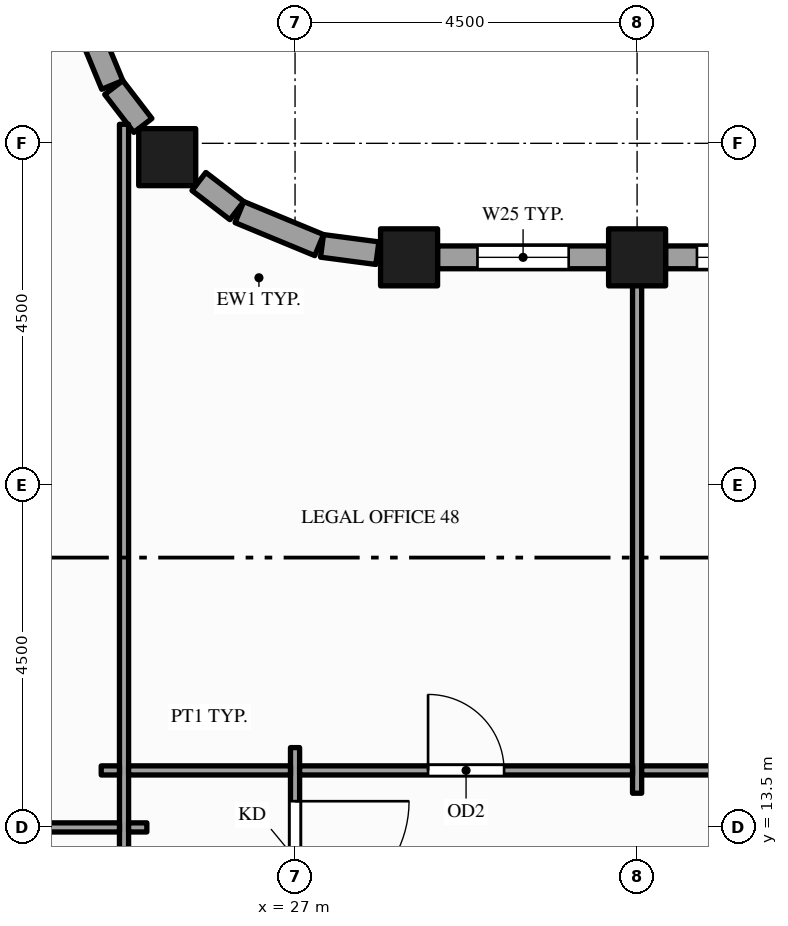
"""IFC4 building model, lengths in metres.
Left out: names, types, materials, properties, quantities, classifications, styles, units other than length and angle.
Written with IfcOpenShell. Run it as: python <this file> out.ifc"""

import sys

from ifc_helpers import new_model, si_unit, direction, frame, frame_2d, origin, origin_2d, place, context, subcontext, project, spatial, rectangle, hollow_rectangle, extrude, element, fill, save


model = new_model("IFC4")
c1 = context("Model", 3, precision=1e-05, world=origin(), true_north=direction((0.0, 1.0)))
c2 = subcontext(c1, "Body", "Model", "MODEL_VIEW")
j1 = project(units=[si_unit("LENGTHUNIT", "METRE"), si_unit("PLANEANGLEUNIT", "RADIAN")], contexts=[c1])
p1 = place(None, origin())
s1 = spatial("IfcSite", under=j1, at=p1, CompositionType="ELEMENT")
p2 = place(p1, origin())
s2 = spatial("IfcBuilding", under=s1, at=p2, CompositionType="ELEMENT")
p3 = place(p2, frame((0.0, 0.0, 239.0)))
s3 = spatial("IfcBuildingStorey", under=s2, at=p3, CompositionType="ELEMENT", Elevation=239.0)
p4 = place(p3, frame((25.318, 22.318, -0.15), z_axis=(0.0, 0.0, 1.0), x_axis=(1.0, 0.0, 0.0)))
e1 = element("IfcColumn", 1, at=p4, inside=s3, PredefinedType="COLUMN", context=c2, shape_type="SweptSolid", body=[
    extrude(hollow_rectangle(XDim=0.75, YDim=0.75, WallThickness=0.036, at=origin_2d()), origin(), (0.0, 0.0, 1.0), 3.85),
])
for number, where, z_axis, x_axis in (
    (2, (28.5, 21.0, -0.15), (0.0, 0.0, 1.0), (1.0, 0.0, 0.0)),
    (3, (31.5, 21.0, -0.15), (0.0, 0.0, 1.0), (1.0, 0.0, 0.0)),
):
    element("IfcColumn", number, at=place(p3, frame(where, z_axis=z_axis, x_axis=x_axis)), inside=s3, PredefinedType="COLUMN", context=c2, shape_type="SweptSolid", body=[
        extrude(hollow_rectangle(XDim=0.75, YDim=0.75, WallThickness=0.036, at=origin_2d()), origin(), (0.0, 0.0, 1.0), 3.9),
    ])
p5 = place(p3, frame((35.625, 21.0, 0.0), z_axis=(0.0, 0.0, 1.0), x_axis=(-1.0, 0.0, 0.0)))
e4 = element("IfcWall", 4, at=p5, inside=s3, PredefinedType="STANDARD", context=c2, shape_type="SweptSolid", body=[
    extrude(rectangle(XDim=3.75, YDim=0.3, at=frame_2d((1.875, 0.0))), origin(), (0.0, 0.0, 1.0), 2.77),
])
p6 = place(p5, frame((0.413, 0.0, 0.9)))
e5 = element("IfcOpeningElement", 5, at=p6, cuts=e4, PredefinedType="OPENING", context=c2, shape_type="SweptSolid", body=[
    extrude(rectangle(XDim=1.15, YDim=1.5, at=frame_2d((0.575, 0.75))), frame((0.0, 0.16, 0.0), z_axis=(0.0, -1.0, 0.0), x_axis=(1.0, 0.0, 0.0)), (0.0, 0.0, 1.0), 0.32),
])
p7 = place(p5, frame((2.188, 0.0, 0.9)))
e6 = element("IfcOpeningElement", 6, at=p7, cuts=e4, PredefinedType="OPENING", context=c2, shape_type="SweptSolid", body=[
    extrude(rectangle(XDim=1.15, YDim=1.5, at=frame_2d((0.575, 0.75))), frame((0.0, 0.16, 0.0), z_axis=(0.0, -1.0, 0.0), x_axis=(1.0, 0.0, 0.0)), (0.0, 0.0, 1.0), 0.32),
])
p8 = place(p3, frame((31.125, 21.0, 0.0), z_axis=(0.0, 0.0, 1.0), x_axis=(-1.0, 0.0, 0.0)))
e7 = element("IfcWall", 7, at=p8, inside=s3, PredefinedType="STANDARD", context=c2, shape_type="SweptSolid", body=[
    extrude(rectangle(XDim=2.25, YDim=0.3, at=frame_2d((1.125, 0.0))), origin(), (0.0, 0.0, 1.0), 2.77),
])
p9 = place(p8, frame((0.525, 0.0, 0.9)))
e8 = element("IfcOpeningElement", 8, at=p9, cuts=e7, PredefinedType="OPENING", context=c2, shape_type="SweptSolid", body=[
    extrude(rectangle(XDim=1.2, YDim=1.5, at=frame_2d((0.6, 0.75))), frame((0.0, 0.16, 0.0), z_axis=(0.0, -1.0, 0.0), x_axis=(1.0, 0.0, 0.0)), (0.0, 0.0, 1.0), 0.32),
])
p10 = place(p3, frame((28.083, 21.055, 0.0), z_axis=(0.0, 0.0, 1.0), x_axis=(-0.99142711513, 0.130660917588, 0.0)))
e9 = element("IfcWall", 9, at=p10, inside=s3, PredefinedType="STANDARD", context=c2, shape_type="SweptSolid", body=[
    extrude(rectangle(XDim=0.734, YDim=0.3, at=frame_2d((0.367, 0.0))), origin(), (0.0, 0.0, 1.0), 3.057),
])
p11 = place(p3, frame((27.317, 21.161, 0.0), z_axis=(0.0, 0.0, 1.0), x_axis=(-0.923914616768, 0.382598720491, 0.0)))
e10 = element("IfcWall", 10, at=p11, inside=s3, PredefinedType="STANDARD", context=c2, shape_type="SweptSolid", body=[
    extrude(rectangle(XDim=1.135, YDim=0.3, at=frame_2d((0.568, 0.0))), origin(), (0.0, 0.0, 1.0), 2.77),
])
for number, where, z_axis, x_axis in (
    (11, (26.234, 21.615, 0.0), (0.0, 0.0, 1.0), (-0.794, 0.608, 0.0)),
    (12, (24.998, 22.735, 0.0), (0.0, 0.0, 1.0), (-0.608, 0.794, 0.0)),
):
    element("IfcWall", number, at=place(p3, frame(where, z_axis=z_axis, x_axis=x_axis)), inside=s3, PredefinedType="STANDARD", context=c2, shape_type="SweptSolid", body=[
        extrude(rectangle(XDim=0.629, YDim=0.3, at=frame_2d((0.314, 0.0))), origin(), (0.0, 0.0, 1.0), 3.057),
    ])
p12 = place(p3, frame((24.595, 23.268, 0.0), z_axis=(0.0, 0.0, 1.0), x_axis=(-0.382598720491, 0.923914616768, 0.0)))
e13 = element("IfcWall", 13, at=p12, inside=s3, PredefinedType="STANDARD", context=c2, shape_type="SweptSolid", body=[
    extrude(rectangle(XDim=1.135, YDim=0.3, at=frame_2d((0.568, 0.0))), origin(), (0.0, 0.0, 1.0), 3.057),
])
p13 = place(p3, frame((24.75, -1.35, 0.0), z_axis=(0.0, 0.0, 1.0), x_axis=(0.0, 1.0, 0.0)))
e14 = element("IfcWall", 14, at=p13, inside=s3, PredefinedType="PARTITIONING", context=c2, shape_type="SweptSolid", body=[
    extrude(rectangle(XDim=24.101, YDim=0.12, at=frame_2d((12.05, 0.0))), origin(), (0.0, 0.0, 1.0), 2.72),
])
p14 = place(p13, frame((12.975, 0.0, 0.0)))
e15 = element("IfcOpeningElement", 15, at=p14, cuts=e14, PredefinedType="OPENING", context=c2, shape_type="SweptSolid", body=[
    extrude(rectangle(XDim=1.5, YDim=2.1, at=frame_2d((0.75, 1.05))), frame((0.0, 0.07, 0.0), z_axis=(0.0, -1.0, 0.0), x_axis=(1.0, 0.0, 0.0)), (0.0, 0.0, 1.0), 0.14),
])
p15 = place(p3, frame((27.0, 4.95, 0.0), z_axis=(0.0, 0.0, 1.0), x_axis=(0.0, 1.0, 0.0)))
e16 = element("IfcWall", 16, at=p15, inside=s3, PredefinedType="PARTITIONING", context=c2, shape_type="SweptSolid", body=[
    extrude(rectangle(XDim=9.6, YDim=0.12, at=frame_2d((4.8, 0.0))), origin(), (0.0, 0.0, 1.0), 2.77),
])
p16 = place(p15, frame((0.705, 0.0, 0.0)))
e17 = element("IfcOpeningElement", 17, at=p16, cuts=e16, PredefinedType="OPENING", context=c2, shape_type="SweptSolid", body=[
    extrude(rectangle(XDim=1.5, YDim=2.1, at=frame_2d((0.75, 1.05))), frame((0.0, 0.07, 0.0), z_axis=(0.0, -1.0, 0.0), x_axis=(1.0, 0.0, 0.0)), (0.0, 0.0, 1.0), 0.14),
])
p17 = place(p15, frame((7.395, 0.0, 0.0)))
e18 = element("IfcOpeningElement", 18, at=p17, cuts=e16, PredefinedType="OPENING", context=c2, shape_type="SweptSolid", body=[
    extrude(rectangle(XDim=1.5, YDim=2.1, at=frame_2d((0.75, 1.05))), frame((0.0, 0.07, 0.0), z_axis=(0.0, -1.0, 0.0), x_axis=(1.0, 0.0, 0.0)), (0.0, 0.0, 1.0), 0.14),
])
p18 = place(p3, frame((31.5, 13.95, 0.0), z_axis=(0.0, 0.0, 1.0), x_axis=(0.0, 1.0, 0.0)))
e19 = element("IfcWall", 19, at=p18, inside=s3, PredefinedType="PARTITIONING", context=c2, shape_type="SweptSolid", body=[
    extrude(rectangle(XDim=6.9, YDim=0.12, at=frame_2d((3.45, 0.0))), origin(), (0.0, 0.0, 1.0), 2.77),
])
p19 = place(p3, frame((11.31, 13.5, 0.0), z_axis=(0.0, 0.0, 1.0), x_axis=(1.0, 0.0, 0.0)))
e20 = element("IfcWall", 20, at=p19, inside=s3, PredefinedType="PARTITIONING", context=c2, shape_type="SweptSolid", body=[
    extrude(rectangle(XDim=13.38, YDim=0.12, at=frame_2d((6.69, 0.0))), origin(), (0.0, 0.0, 1.0), 2.77),
])
p20 = place(p19, frame((3.54, 0.0, 0.0)))
e21 = element("IfcOpeningElement", 21, at=p20, cuts=e20, PredefinedType="OPENING", context=c2, shape_type="SweptSolid", body=[
    extrude(rectangle(XDim=1.8, YDim=2.1, at=frame_2d((0.9, 1.05))), frame((0.0, 0.07, 0.0), z_axis=(0.0, -1.0, 0.0), x_axis=(1.0, 0.0, 0.0)), (0.0, 0.0, 1.0), 0.14),
])
for number, where, z_axis, x_axis in (
    (22, (24.81, 13.5, 0.0), (0.0, 0.0, 1.0), (1.0, 0.0, 0.0)),
    (23, (24.45, 14.25, 0.0), (0.0, 0.0, 1.0), (1.0, 0.0, 0.0)),
):
    element("IfcWall", number, at=place(p3, frame(where, z_axis=z_axis, x_axis=x_axis)), inside=s3, PredefinedType="PARTITIONING", context=c2, shape_type="SweptSolid", body=[
        extrude(rectangle(XDim=0.24, YDim=0.12, at=frame_2d((0.12, 0.0))), origin(), (0.0, 0.0, 1.0), 2.77),
    ])
p21 = place(p3, frame((24.81, 14.25, 0.0), z_axis=(0.0, 0.0, 1.0), x_axis=(1.0, 0.0, 0.0)))
e24 = element("IfcWall", 24, at=p21, inside=s3, PredefinedType="PARTITIONING", context=c2, shape_type="SweptSolid", body=[
    extrude(rectangle(XDim=2.13, YDim=0.12, at=frame_2d((1.065, 0.0))), origin(), (0.0, 0.0, 1.0), 2.77),
])
p22 = place(p3, frame((27.06, 14.25, 0.0), z_axis=(0.0, 0.0, 1.0), x_axis=(1.0, 0.0, 0.0)))
e25 = element("IfcWall", 25, at=p22, inside=s3, PredefinedType="PARTITIONING", context=c2, shape_type="SweptSolid", body=[
    extrude(rectangle(XDim=4.38, YDim=0.12, at=frame_2d((2.19, 0.0))), origin(), (0.0, 0.0, 1.0), 2.77),
])
p23 = place(p22, frame((1.69, 0.0, 0.0)))
e26 = element("IfcOpeningElement", 26, at=p23, cuts=e25, PredefinedType="OPENING", context=c2, shape_type="SweptSolid", body=[
    extrude(rectangle(XDim=1.0, YDim=2.1, at=frame_2d((0.5, 1.05))), frame((0.0, 0.07, 0.0), z_axis=(0.0, -1.0, 0.0), x_axis=(1.0, 0.0, 0.0)), (0.0, 0.0, 1.0), 0.14),
])
p24 = place(p3, frame((31.56, 14.25, 0.0), z_axis=(0.0, 0.0, 1.0), x_axis=(1.0, 0.0, 0.0)))
e27 = element("IfcWall", 27, at=p24, inside=s3, PredefinedType="PARTITIONING", context=c2, shape_type="SweptSolid", body=[
    extrude(rectangle(XDim=4.38, YDim=0.12, at=frame_2d((2.19, 0.0))), origin(), (0.0, 0.0, 1.0), 2.77),
])
p25 = place(p24, frame((1.69, 0.0, 0.0)))
e28 = element("IfcOpeningElement", 28, at=p25, cuts=e27, PredefinedType="OPENING", context=c2, shape_type="SweptSolid", body=[
    extrude(rectangle(XDim=1.0, YDim=2.1, at=frame_2d((0.5, 1.05))), frame((0.0, 0.07, 0.0), z_axis=(0.0, -1.0, 0.0), x_axis=(1.0, 0.0, 0.0)), (0.0, 0.0, 1.0), 0.14),
])
p26 = place(p7, origin())
e29 = element("IfcWindow", 29, at=p26, inside=s3, PartitioningType="SINGLE_PANEL", PredefinedType="WINDOW", context=c2, shape_type="SweptSolid", body=[
    extrude(rectangle(XDim=1.15, YDim=1.5, at=frame_2d((0.575, 0.75))), frame((0.0, 0.03, 0.0), z_axis=(0.0, -1.0, 0.0), x_axis=(1.0, 0.0, 0.0)), (0.0, 0.0, 1.0), 0.06),
])
fill(e6, e29)
p27 = place(p9, origin())
e30 = element("IfcWindow", 30, at=p27, inside=s3, PartitioningType="SINGLE_PANEL", PredefinedType="WINDOW", context=c2, shape_type="SweptSolid", body=[
    extrude(rectangle(XDim=1.2, YDim=1.5, at=frame_2d((0.6, 0.75))), frame((0.0, 0.03, 0.0), z_axis=(0.0, -1.0, 0.0), x_axis=(1.0, 0.0, 0.0)), (0.0, 0.0, 1.0), 0.06),
])
fill(e8, e30)
p28 = place(p17, origin())
e31 = element("IfcDoor", 31, at=p28, inside=s3, OperationType="SINGLE_SWING_RIGHT", PredefinedType="DOOR", context=c2, shape_type="SweptSolid", body=[
    extrude(rectangle(XDim=1.5, YDim=2.1, at=frame_2d((0.75, 1.05))), frame((0.0, 0.025, 0.0), z_axis=(0.0, -1.0, 0.0), x_axis=(1.0, 0.0, 0.0)), (0.0, 0.0, 1.0), 0.05),
])
fill(e18, e31)
p29 = place(p23, origin())
e32 = element("IfcDoor", 32, at=p29, inside=s3, OperationType="SINGLE_SWING_LEFT", PredefinedType="DOOR", context=c2, shape_type="SweptSolid", body=[
    extrude(rectangle(XDim=1.0, YDim=2.1, at=frame_2d((0.5, 1.05))), frame((0.0, 0.025, 0.0), z_axis=(0.0, -1.0, 0.0), x_axis=(1.0, 0.0, 0.0)), (0.0, 0.0, 1.0), 0.05),
])
fill(e26, e32)
save(model, sys.argv[1])
